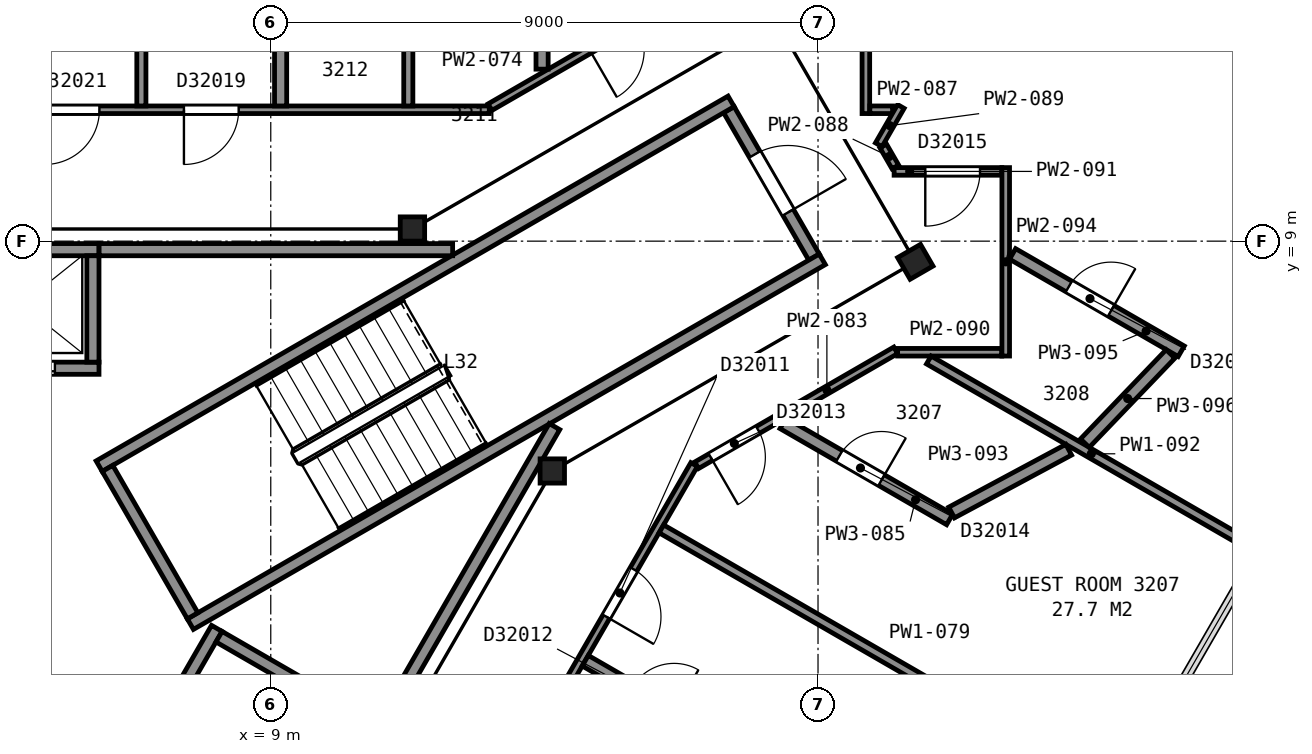
"""IFC4 building model, lengths in metres.
Left out: names, types, materials, properties, quantities, classifications, styles, units other than length and angle.
Written with IfcOpenShell. Run it as: python <this file> out.ifc"""

import sys

from ifc_helpers import new_model, si_unit, direction, frame, frame_2d, origin, origin_2d, place, context, subcontext, project, spatial, rectangle, i_section, extrude, element, fill, save


model = new_model("IFC4")
c1 = context("Model", 3, precision=1e-05, world=origin(), true_north=direction((0.0, 1.0)))
c2 = subcontext(c1, "Body", "Model", "MODEL_VIEW")
j1 = project(units=[si_unit("LENGTHUNIT", "METRE"), si_unit("PLANEANGLEUNIT", "RADIAN")], contexts=[c1])
p1 = place(None, origin())
s1 = spatial("IfcSite", under=j1, at=p1, CompositionType="ELEMENT")
p2 = place(p1, origin())
s2 = spatial("IfcBuilding", under=s1, at=p2, CompositionType="ELEMENT")
p3 = place(p2, frame((0.0, 0.0, 132.4)))
s3 = spatial("IfcBuildingStorey", under=s2, at=p3, CompositionType="ELEMENT", Elevation=132.4)
p4 = place(p3, frame((13.63, 5.22, 0.0), z_axis=(0.0, 0.0, 1.0), x_axis=(1.0, 0.0, 0.0)))
e1 = element("IfcColumn", 1, at=p4, inside=s3, PredefinedType="COLUMN", context=c2, shape_type="SweptSolid", body=[
    extrude(i_section(OverallWidth=0.401, OverallDepth=0.399, WebThickness=0.025, FlangeThickness=0.04, FilletRadius=0.015, at=origin_2d()), origin(), (0.0, 0.0, 1.0), 3.6),
])
p5 = place(p3, frame((19.6, 8.66, 0.0), z_axis=(0.0, 0.0, 1.0), x_axis=(0.5, -0.866025403784, 0.0)))
e2 = element("IfcColumn", 2, at=p5, inside=s3, PredefinedType="COLUMN", context=c2, shape_type="SweptSolid", body=[
    extrude(i_section(OverallWidth=0.411, OverallDepth=0.434, WebThickness=0.036, FlangeThickness=0.057, FilletRadius=0.015, at=origin_2d()), origin(), (0.0, 0.0, 1.0), 3.6),
])
p6 = place(p3, frame((11.33, 9.2, 0.0), z_axis=(0.0, 0.0, 1.0), x_axis=(1.0, 0.0, 0.0)))
e3 = element("IfcColumn", 3, at=p6, inside=s3, PredefinedType="COLUMN", context=c2, shape_type="SweptSolid", body=[
    extrude(i_section(OverallWidth=0.401, OverallDepth=0.399, WebThickness=0.025, FlangeThickness=0.04, FilletRadius=0.015, at=origin_2d()), origin(), (0.0, 0.0, 1.0), 3.6),
])
p7 = place(p3, frame((17.934, 8.738, 0.0), z_axis=(0.0, 0.0, 1.0), x_axis=(-0.49998411664, 0.866034573852, 0.0)))
e4 = element("IfcWall", 4, at=p7, inside=s3, PredefinedType="PARTITIONING", context=c2, shape_type="SweptSolid", body=[
    extrude(rectangle(XDim=2.8, YDim=0.2, at=frame_2d((1.4, 0.0))), origin(), (0.0, 0.0, 1.0), 3.35),
])
p8 = place(p7, frame((0.85, 0.0, 0.0)))
e5 = element("IfcOpeningElement", 5, at=p8, cuts=e4, PredefinedType="OPENING", context=c2, shape_type="SweptSolid", body=[
    extrude(rectangle(XDim=1.1, YDim=2.1, at=frame_2d((0.55, 1.05))), frame((0.0, 0.11, 0.0), z_axis=(0.0, -1.0, 0.0), x_axis=(1.0, 0.0, 0.0)), (0.0, 0.0, 1.0), 0.22),
])
for number, where, z_axis, x_axis in (
    (6, (6.178, 5.299, 0.0), (0.0, 0.0, 1.0), (0.866, 0.5, 0.0)),
    (7, (7.678, 2.701, 0.0), (0.0, 0.0, 1.0), (0.866, 0.5, 0.0)),
):
    element("IfcWall", number, at=place(p3, frame(where, z_axis=z_axis, x_axis=x_axis)), inside=s3, PredefinedType="PARTITIONING", context=c2, shape_type="SweptSolid", body=[
        extrude(rectangle(XDim=12.0, YDim=0.2, at=frame_2d((6.0, 0.0))), origin(), (0.0, 0.0, 1.0), 3.35),
    ])
p9 = place(p3, frame((7.715, 2.838, 0.0), z_axis=(0.0, 0.0, 1.0), x_axis=(-0.500049511043, 0.865996816683, 0.0)))
e8 = element("IfcWall", 8, at=p9, inside=s3, PredefinedType="PARTITIONING", context=c2, shape_type="SweptSolid", body=[
    extrude(rectangle(XDim=2.8, YDim=0.2, at=frame_2d((1.4, 0.0))), origin(), (0.0, 0.0, 1.0), 3.35),
])
p10 = place(p3, frame((3.625, 6.91, 0.0), z_axis=(0.0, 0.0, 1.0), x_axis=(1.0, 0.0, 0.0)))
e9 = element("IfcWall", 9, at=p10, inside=s3, PredefinedType="PARTITIONING", context=c2, shape_type="SweptSolid", body=[
    extrude(rectangle(XDim=2.55, YDim=0.2, at=frame_2d((1.275, 0.0))), origin(), (0.0, 0.0, 1.0), 3.6),
])
p11 = place(p10, frame((0.725, 0.0, 0.0)))
e10 = element("IfcOpeningElement", 10, at=p11, cuts=e9, PredefinedType="OPENING", context=c2, shape_type="SweptSolid", body=[
    extrude(rectangle(XDim=1.1, YDim=2.1, at=frame_2d((0.55, 1.05))), frame((0.0, 0.11, 0.0), z_axis=(0.0, -1.0, 0.0), x_axis=(1.0, 0.0, 0.0)), (0.0, 0.0, 1.0), 0.22),
])
p12 = place(p3, frame((3.625, 8.86, 0.0), z_axis=(0.0, 0.0, 1.0), x_axis=(1.0, 0.0, 0.0)))
e11 = element("IfcWall", 11, at=p12, inside=s3, PredefinedType="PARTITIONING", context=c2, shape_type="SweptSolid", body=[
    extrude(rectangle(XDim=2.55, YDim=0.2, at=frame_2d((1.275, 0.0))), origin(), (0.0, 0.0, 1.0), 3.6),
])
p13 = place(p3, frame((5.663, -1.612, 0.0), z_axis=(0.0, 0.0, 1.0), x_axis=(0.49998122708, 0.866036242063, 0.0)))
e12 = element("IfcWall", 12, at=p13, inside=s3, PredefinedType="PARTITIONING", context=c2, shape_type="SweptSolid", body=[
    extrude(rectangle(XDim=4.9, YDim=0.2, at=frame_2d((2.45, 0.0))), origin(), (0.0, 0.0, 1.0), 3.6),
])
p14 = place(p3, frame((6.075, 7.01, 0.0), z_axis=(0.0, 0.0, 1.0), x_axis=(0.0, 1.0, 0.0)))
e13 = element("IfcWall", 13, at=p14, inside=s3, PredefinedType="PARTITIONING", context=c2, shape_type="SweptSolid", body=[
    extrude(rectangle(XDim=1.75, YDim=0.2, at=frame_2d((0.875, 0.0))), origin(), (0.0, 0.0, 1.0), 3.6),
])
p15 = place(p3, frame((9.665, 1.62, 0.0), z_axis=(0.0, 0.0, 1.0), x_axis=(-0.866002029911, 0.500040482552, 0.0)))
e14 = element("IfcWall", 14, at=p15, inside=s3, PredefinedType="PARTITIONING", context=c2, shape_type="SweptSolid", body=[
    extrude(rectangle(XDim=1.75, YDim=0.2, at=frame_2d((0.875, 0.0))), origin(), (0.0, 0.0, 1.0), 3.6),
])
p16 = place(p3, frame((6.177, 8.86, 0.0), z_axis=(0.0, 0.0, 1.0), x_axis=(1.0, 0.0, 0.0)))
e15 = element("IfcWall", 15, at=p16, inside=s3, PredefinedType="PARTITIONING", context=c2, shape_type="SweptSolid", body=[
    extrude(rectangle(XDim=5.814, YDim=0.2, at=frame_2d((2.907, 0.0))), origin(), (0.0, 0.0, 1.0), 3.35),
])
p17 = place(p3, frame((8.492, -3.012, 0.0), z_axis=(0.0, 0.0, 1.0), x_axis=(0.499972957231, 0.866041016371, 0.0)))
e16 = element("IfcWall", 16, at=p17, inside=s3, PredefinedType="PARTITIONING", context=c2, shape_type="SweptSolid", body=[
    extrude(rectangle(XDim=10.349, YDim=0.2, at=frame_2d((5.174, 0.0))), origin(), (0.0, 0.0, 1.0), 3.35),
])
p18 = place(p3, frame((-12.594, 11.161, 0.0), z_axis=(0.0, 0.0, 1.0), x_axis=(1.0, 0.0, 0.0)))
e17 = element("IfcWall", 17, at=p18, inside=s3, PredefinedType="PARTITIONING", context=c2, shape_type="SweptSolid", body=[
    extrude(rectangle(XDim=25.187, YDim=0.125, at=frame_2d((12.594, 0.0))), origin(), (0.0, 0.0, 1.0), 2.613),
])
p19 = place(p18, frame((20.166, 0.0, 0.0)))
e18 = element("IfcOpeningElement", 18, at=p19, cuts=e17, PredefinedType="OPENING", context=c2, shape_type="SweptSolid", body=[
    extrude(rectangle(XDim=0.9, YDim=2.1, at=frame_2d((0.45, 1.05))), frame((0.0, 0.073, 0.0), z_axis=(0.0, -1.0, 0.0), x_axis=(1.0, 0.0, 0.0)), (0.0, 0.0, 1.0), 0.145),
])
p20 = place(p18, frame((17.875, 0.0, 0.0)))
e19 = element("IfcOpeningElement", 19, at=p20, cuts=e17, PredefinedType="OPENING", context=c2, shape_type="SweptSolid", body=[
    extrude(rectangle(XDim=0.9, YDim=2.1, at=frame_2d((0.45, 1.05))), frame((0.0, 0.073, 0.0), z_axis=(0.0, -1.0, 0.0), x_axis=(1.0, 0.0, 0.0)), (0.0, 0.0, 1.0), 0.145),
])
p21 = place(p18, frame((11.062, 0.0, 0.0)))
e20 = element("IfcOpeningElement", 20, at=p21, cuts=e17, PredefinedType="OPENING", context=c2, shape_type="SweptSolid", body=[
    extrude(rectangle(XDim=0.9, YDim=2.1, at=frame_2d((0.45, 1.05))), frame((0.0, 0.073, 0.0), z_axis=(0.0, -1.0, 0.0), x_axis=(1.0, 0.0, 0.0)), (0.0, 0.0, 1.0), 0.145),
])
p22 = place(p18, frame((8.521, 0.0, 0.0)))
e21 = element("IfcOpeningElement", 21, at=p22, cuts=e17, PredefinedType="OPENING", context=c2, shape_type="SweptSolid", body=[
    extrude(rectangle(XDim=0.9, YDim=2.1, at=frame_2d((0.45, 1.05))), frame((0.0, 0.073, 0.0), z_axis=(0.0, -1.0, 0.0), x_axis=(1.0, 0.0, 0.0)), (0.0, 0.0, 1.0), 0.145),
])
p23 = place(p18, frame((2.031, 0.0, 0.0)))
e22 = element("IfcOpeningElement", 22, at=p23, cuts=e17, PredefinedType="OPENING", context=c2, shape_type="SweptSolid", body=[
    extrude(rectangle(XDim=0.9, YDim=2.1, at=frame_2d((0.45, 1.05))), frame((0.0, 0.073, 0.0), z_axis=(0.0, -1.0, 0.0), x_axis=(1.0, 0.0, 0.0)), (0.0, 0.0, 1.0), 0.145),
])
p24 = place(p3, frame((15.962, 5.326, 0.0), z_axis=(0.0, 0.0, 1.0), x_axis=(-0.499992829944, -0.866029543379, 0.0)))
e23 = element("IfcWall", 23, at=p24, inside=s3, PredefinedType="PARTITIONING", context=c2, shape_type="SweptSolid", body=[
    extrude(rectangle(XDim=24.413, YDim=0.125, at=frame_2d((12.207, 0.0))), origin(), (0.0, 0.0, 1.0), 2.613),
])
p25 = place(p24, frame((21.258, 0.0, 0.0)))
e24 = element("IfcOpeningElement", 24, at=p25, cuts=e23, PredefinedType="OPENING", context=c2, shape_type="SweptSolid", body=[
    extrude(rectangle(XDim=0.9, YDim=2.1, at=frame_2d((0.45, 1.05))), frame((0.0, 0.073, 0.0), z_axis=(0.0, -1.0, 0.0), x_axis=(1.0, 0.0, 0.0)), (0.0, 0.0, 1.0), 0.145),
])
p26 = place(p24, frame((18.502, 0.0, 0.0)))
e25 = element("IfcOpeningElement", 25, at=p26, cuts=e23, PredefinedType="OPENING", context=c2, shape_type="SweptSolid", body=[
    extrude(rectangle(XDim=0.9, YDim=2.1, at=frame_2d((0.45, 1.05))), frame((0.0, 0.073, 0.0), z_axis=(0.0, -1.0, 0.0), x_axis=(1.0, 0.0, 0.0)), (0.0, 0.0, 1.0), 0.145),
])
p27 = place(p24, frame((11.799, 0.0, 0.0)))
e26 = element("IfcOpeningElement", 26, at=p27, cuts=e23, PredefinedType="OPENING", context=c2, shape_type="SweptSolid", body=[
    extrude(rectangle(XDim=0.9, YDim=2.1, at=frame_2d((0.45, 1.05))), frame((0.0, 0.073, 0.0), z_axis=(0.0, -1.0, 0.0), x_axis=(1.0, 0.0, 0.0)), (0.0, 0.0, 1.0), 0.145),
])
p28 = place(p24, frame((9.043, 0.0, 0.0)))
e27 = element("IfcOpeningElement", 27, at=p28, cuts=e23, PredefinedType="OPENING", context=c2, shape_type="SweptSolid", body=[
    extrude(rectangle(XDim=0.9, YDim=2.1, at=frame_2d((0.45, 1.05))), frame((0.0, 0.073, 0.0), z_axis=(0.0, -1.0, 0.0), x_axis=(1.0, 0.0, 0.0)), (0.0, 0.0, 1.0), 0.145),
])
p29 = place(p24, frame((1.99, 0.0, 0.0)))
e28 = element("IfcOpeningElement", 28, at=p29, cuts=e23, PredefinedType="OPENING", context=c2, shape_type="SweptSolid", body=[
    extrude(rectangle(XDim=0.9, YDim=2.1, at=frame_2d((0.45, 1.05))), frame((0.0, 0.073, 0.0), z_axis=(0.0, -1.0, 0.0), x_axis=(1.0, 0.0, 0.0)), (0.0, 0.0, 1.0), 0.145),
])
p30 = place(p3, frame((6.872, 11.223, 0.0), z_axis=(0.0, 0.0, 1.0), x_axis=(0.0, 1.0, 0.0)))
e29 = element("IfcWall", 29, at=p30, inside=s3, PredefinedType="PARTITIONING", context=c2, shape_type="SweptSolid", body=[
    extrude(rectangle(XDim=8.592, YDim=0.15, at=frame_2d((4.296, 0.0))), origin(), (0.0, 0.0, 1.0), 2.613),
])
p31 = place(p3, frame((9.162, 11.223, 0.0), z_axis=(0.0, 0.0, 1.0), x_axis=(0.0, 1.0, 0.0)))
e30 = element("IfcWall", 30, at=p31, inside=s3, PredefinedType="PARTITIONING", context=c2, shape_type="SweptSolid", body=[
    extrude(rectangle(XDim=2.738, YDim=0.2, at=frame_2d((1.369, 0.0))), origin(), (0.0, 0.0, 1.0), 2.613),
])
p32 = place(p3, frame((11.262, 11.223, 0.0), z_axis=(0.0, 0.0, 1.0), x_axis=(0.0, 1.0, 0.0)))
e31 = element("IfcWall", 31, at=p32, inside=s3, PredefinedType="PARTITIONING", context=c2, shape_type="SweptSolid", body=[
    extrude(rectangle(XDim=8.592, YDim=0.15, at=frame_2d((4.296, 0.0))), origin(), (0.0, 0.0, 1.0), 2.613),
])
p33 = place(p3, frame((12.605, 11.203, 0.0), z_axis=(0.0, 0.0, 1.0), x_axis=(0.866113281362, 0.499847760672, 0.0)))
e32 = element("IfcWall", 32, at=p33, inside=s3, PredefinedType="PARTITIONING", context=c2, shape_type="SweptSolid", body=[
    extrude(rectangle(XDim=3.767, YDim=0.125, at=frame_2d((1.883, 0.0))), origin(), (0.0, 0.0, 1.0), 2.613),
])
p34 = place(p33, frame((1.89, 0.0, 0.0)))
e33 = element("IfcOpeningElement", 33, at=p34, cuts=e32, PredefinedType="OPENING", context=c2, shape_type="SweptSolid", body=[
    extrude(rectangle(XDim=0.9, YDim=2.1, at=frame_2d((0.45, 1.05))), frame((0.0, 0.073, 0.0), z_axis=(0.0, -1.0, 0.0), x_axis=(1.0, 0.0, 0.0)), (0.0, 0.0, 1.0), 0.145),
])
p35 = place(p3, frame((13.462, 11.829, 0.0), z_axis=(0.0, 0.0, 1.0), x_axis=(0.0, 1.0, 0.0)))
e34 = element("IfcWall", 34, at=p35, inside=s3, PredefinedType="PARTITIONING", context=c2, shape_type="SweptSolid", body=[
    extrude(rectangle(XDim=3.203, YDim=0.2, at=frame_2d((1.602, 0.0))), origin(), (0.0, 0.0, 1.0), 2.613),
])
p36 = place(p3, frame((16.542, 0.731, 0.0), z_axis=(0.0, 0.0, 1.0), x_axis=(-0.86596722502, 0.50010075504, 0.0)))
e35 = element("IfcWall", 35, at=p36, inside=s3, PredefinedType="PARTITIONING", context=c2, shape_type="SweptSolid", body=[
    extrude(rectangle(XDim=2.737, YDim=0.2, at=frame_2d((1.369, 0.0))), origin(), (0.0, 0.0, 1.0), 2.613),
])
p37 = place(p36, frame((1.05, 0.0, 0.0)))
e36 = element("IfcOpeningElement", 36, at=p37, cuts=e35, PredefinedType="OPENING", context=c2, shape_type="SweptSolid", body=[
    extrude(rectangle(XDim=0.8, YDim=2.1, at=frame_2d((0.4, 1.05))), frame((0.0, 0.11, 0.0), z_axis=(0.0, -1.0, 0.0), x_axis=(1.0, 0.0, 0.0)), (0.0, 0.0, 1.0), 0.22),
])
p38 = place(p3, frame((15.424, 4.268, 0.0), z_axis=(0.0, 0.0, 1.0), x_axis=(0.866022320763, -0.500005339912, 0.0)))
e37 = element("IfcWall", 37, at=p38, inside=s3, PredefinedType="PARTITIONING", context=c2, shape_type="SweptSolid", body=[
    extrude(rectangle(XDim=8.591, YDim=0.15, at=frame_2d((4.296, 0.0))), origin(), (0.0, 0.0, 1.0), 2.613),
])
p39 = place(p3, frame((19.278, 7.204, 0.0), z_axis=(0.0, 0.0, 1.0), x_axis=(-0.866028547684, -0.499994554566, 0.0)))
e38 = element("IfcWall", 38, at=p39, inside=s3, PredefinedType="PARTITIONING", context=c2, shape_type="SweptSolid", body=[
    extrude(rectangle(XDim=3.78, YDim=0.125, at=frame_2d((1.89, 0.0))), origin(), (0.0, 0.0, 1.0), 2.613),
])
p40 = place(p39, frame((2.615, 0.0, 0.0)))
e39 = element("IfcOpeningElement", 39, at=p40, cuts=e38, PredefinedType="OPENING", context=c2, shape_type="SweptSolid", body=[
    extrude(rectangle(XDim=0.9, YDim=2.1, at=frame_2d((0.45, 1.05))), frame((0.0, 0.073, 0.0), z_axis=(0.0, -1.0, 0.0), x_axis=(1.0, 0.0, 0.0)), (0.0, 0.0, 1.0), 0.145),
])
p41 = place(p3, frame((17.425, 6.004, 0.0), z_axis=(0.0, 0.0, 1.0), x_axis=(0.866145753309, -0.499791490549, 0.0)))
e40 = element("IfcWall", 40, at=p41, inside=s3, PredefinedType="PARTITIONING", context=c2, shape_type="SweptSolid", body=[
    extrude(rectangle(XDim=3.163, YDim=0.2, at=frame_2d((1.582, 0.0))), origin(), (0.0, 0.0, 1.0), 2.613),
])
p42 = place(p41, frame((1.07, 0.0, 0.0)))
e41 = element("IfcOpeningElement", 41, at=p42, cuts=e40, PredefinedType="OPENING", context=c2, shape_type="SweptSolid", body=[
    extrude(rectangle(XDim=0.8, YDim=2.1, at=frame_2d((0.4, 1.05))), frame((0.0, 0.11, 0.0), z_axis=(0.0, -1.0, 0.0), x_axis=(1.0, 0.0, 0.0)), (0.0, 0.0, 1.0), 0.22),
])
p43 = place(p3, frame((18.787, 11.098, 0.0), z_axis=(0.0, 0.0, 1.0), x_axis=(0.0, 1.0, 0.0)))
e42 = element("IfcWall", 42, at=p43, inside=s3, PredefinedType="PARTITIONING", context=c2, shape_type="SweptSolid", body=[
    extrude(rectangle(XDim=2.964, YDim=0.125, at=frame_2d((1.482, 0.0))), origin(), (0.0, 0.0, 1.0), 2.613),
])
p44 = place(p3, frame((18.852, 11.161, 0.0), z_axis=(0.0, 0.0, 1.0), x_axis=(1.0, 0.0, 0.0)))
e43 = element("IfcWall", 43, at=p44, inside=s3, PredefinedType="PARTITIONING", context=c2, shape_type="SweptSolid", body=[
    extrude(rectangle(XDim=0.374, YDim=0.125, at=frame_2d((0.187, 0.0))), origin(), (0.0, 0.0, 1.0), 2.613),
])
p45 = place(p3, frame((19.073, 10.565, 0.0), z_axis=(0.0, 0.0, 1.0), x_axis=(0.499899443193, -0.866083452501, 0.0)))
e44 = element("IfcWall", 44, at=p45, inside=s3, PredefinedType="PARTITIONING", context=c2, shape_type="SweptSolid", body=[
    extrude(rectangle(XDim=0.398, YDim=0.125, at=frame_2d((0.199, 0.0))), origin(), (0.0, 0.0, 1.0), 2.613),
])
p46 = place(p3, frame((18.999, 10.585, 0.0), z_axis=(0.0, 0.0, 1.0), x_axis=(0.499712769023, 0.866191173169, 0.0)))
e45 = element("IfcWall", 45, at=p46, inside=s3, PredefinedType="PARTITIONING", context=c2, shape_type="SweptSolid", body=[
    extrude(rectangle(XDim=0.728, YDim=0.125, at=frame_2d((0.364, 0.0))), origin(), (0.0, 0.0, 1.0), 2.613),
])
p47 = place(p3, frame((19.309, 7.173, 0.0), z_axis=(0.0, 0.0, 1.0), x_axis=(1.0, 0.0, 0.0)))
e46 = element("IfcWall", 46, at=p47, inside=s3, PredefinedType="PARTITIONING", context=c2, shape_type="SweptSolid", body=[
    extrude(rectangle(XDim=1.713, YDim=0.125, at=frame_2d((0.856, 0.0))), origin(), (0.0, 0.0, 1.0), 2.613),
])
p48 = place(p3, frame((19.251, 10.147, 0.0), z_axis=(0.0, 0.0, 1.0), x_axis=(1.0, 0.0, 0.0)))
e47 = element("IfcWall", 47, at=p48, inside=s3, PredefinedType="PARTITIONING", context=c2, shape_type="SweptSolid", body=[
    extrude(rectangle(XDim=1.771, YDim=0.125, at=frame_2d((0.885, 0.0))), origin(), (0.0, 0.0, 1.0), 2.613),
])
p49 = place(p48, frame((0.512, 0.0, 0.0)))
e48 = element("IfcOpeningElement", 48, at=p49, cuts=e47, PredefinedType="OPENING", context=c2, shape_type="SweptSolid", body=[
    extrude(rectangle(XDim=0.9, YDim=2.1, at=frame_2d((0.45, 1.05))), frame((0.0, 0.073, 0.0), z_axis=(0.0, -1.0, 0.0), x_axis=(1.0, 0.0, 0.0)), (0.0, 0.0, 1.0), 0.145),
])
p50 = place(p3, frame((19.822, 7.046, 0.0), z_axis=(0.0, 0.0, 1.0), x_axis=(0.866041323853, -0.499972424619, 0.0)))
e49 = element("IfcWall", 49, at=p50, inside=s3, PredefinedType="PARTITIONING", context=c2, shape_type="SweptSolid", body=[
    extrude(rectangle(XDim=6.172, YDim=0.15, at=frame_2d((3.086, 0.0))), origin(), (0.0, 0.0, 1.0), 2.613),
])
p51 = place(p3, frame((20.197, 4.537, 0.0), z_axis=(0.0, 0.0, 1.0), x_axis=(0.881162538645, 0.472813473253, 0.0)))
e50 = element("IfcWall", 50, at=p51, inside=s3, PredefinedType="PARTITIONING", context=c2, shape_type="SweptSolid", body=[
    extrude(rectangle(XDim=2.185, YDim=0.2, at=frame_2d((1.093, 0.0))), origin(), (0.0, 0.0, 1.0), 2.613),
])
p52 = place(p3, frame((21.087, 7.111, 0.0), z_axis=(0.0, 0.0, 1.0), x_axis=(0.0, 1.0, 0.0)))
e51 = element("IfcWall", 51, at=p52, inside=s3, PredefinedType="PARTITIONING", context=c2, shape_type="SweptSolid", body=[
    extrude(rectangle(XDim=3.099, YDim=0.125, at=frame_2d((1.549, 0.0))), origin(), (0.0, 0.0, 1.0), 2.613),
])
p53 = place(p3, frame((23.974, 7.189, 0.0), z_axis=(0.0, 0.0, 1.0), x_axis=(-0.866105631149, 0.499861016376, 0.0)))
e52 = element("IfcWall", 52, at=p53, inside=s3, PredefinedType="PARTITIONING", context=c2, shape_type="SweptSolid", body=[
    extrude(rectangle(XDim=3.203, YDim=0.2, at=frame_2d((1.602, 0.0))), origin(), (0.0, 0.0, 1.0), 2.613),
])
p54 = place(p53, frame((1.333, 0.0, 0.0)))
e53 = element("IfcOpeningElement", 53, at=p54, cuts=e52, PredefinedType="OPENING", context=c2, shape_type="SweptSolid", body=[
    extrude(rectangle(XDim=0.8, YDim=2.1, at=frame_2d((0.4, 1.05))), frame((0.0, 0.11, 0.0), z_axis=(0.0, -1.0, 0.0), x_axis=(1.0, 0.0, 0.0)), (0.0, 0.0, 1.0), 0.22),
])
p55 = place(p3, frame((22.388, 5.677, 0.0), z_axis=(0.0, 0.0, 1.0), x_axis=(0.692374421384, 0.721538398572, 0.0)))
e54 = element("IfcWall", 54, at=p55, inside=s3, PredefinedType="PARTITIONING", context=c2, shape_type="SweptSolid", body=[
    extrude(rectangle(XDim=2.034, YDim=0.2, at=frame_2d((1.017, 0.0))), origin(), (0.0, 0.0, 1.0), 2.613),
])
p56 = place(p8, origin())
e55 = element("IfcDoor", 55, at=p56, inside=s3, OperationType="SINGLE_SWING_LEFT", PredefinedType="DOOR", context=c2, shape_type="SweptSolid", body=[
    extrude(rectangle(XDim=1.1, YDim=2.1, at=frame_2d((0.55, 1.05))), frame((0.0, 0.025, 0.0), z_axis=(0.0, -1.0, 0.0), x_axis=(1.0, 0.0, 0.0)), (0.0, 0.0, 1.0), 0.05),
])
fill(e5, e55)
p57 = place(p11, origin())
e56 = element("IfcDoor", 56, at=p57, inside=s3, OperationType="SLIDING_TO_LEFT", PredefinedType="DOOR", context=c2, shape_type="SweptSolid", body=[
    extrude(rectangle(XDim=1.1, YDim=2.1, at=frame_2d((0.55, 1.05))), frame((0.0, 0.025, 0.0), z_axis=(0.0, -1.0, 0.0), x_axis=(1.0, 0.0, 0.0)), (0.0, 0.0, 1.0), 0.05),
])
fill(e10, e56)
p58 = place(p19, origin())
e57 = element("IfcDoor", 57, at=p58, inside=s3, OperationType="SINGLE_SWING_LEFT", PredefinedType="DOOR", context=c2, shape_type="SweptSolid", body=[
    extrude(rectangle(XDim=0.9, YDim=2.1, at=frame_2d((0.45, 1.05))), frame((0.0, 0.025, 0.0), z_axis=(0.0, -1.0, 0.0), x_axis=(1.0, 0.0, 0.0)), (0.0, 0.0, 1.0), 0.05),
])
fill(e18, e57)
p59 = place(p20, origin())
e58 = element("IfcDoor", 58, at=p59, inside=s3, OperationType="SINGLE_SWING_LEFT", PredefinedType="DOOR", context=c2, shape_type="SweptSolid", body=[
    extrude(rectangle(XDim=0.9, YDim=2.1, at=frame_2d((0.45, 1.05))), frame((0.0, 0.025, 0.0), z_axis=(0.0, -1.0, 0.0), x_axis=(1.0, 0.0, 0.0)), (0.0, 0.0, 1.0), 0.05),
])
fill(e19, e58)
p60 = place(p29, origin())
e59 = element("IfcDoor", 59, at=p60, inside=s3, OperationType="SINGLE_SWING_RIGHT", PredefinedType="DOOR", context=c2, shape_type="SweptSolid", body=[
    extrude(rectangle(XDim=0.9, YDim=2.1, at=frame_2d((0.45, 1.05))), frame((0.0, 0.025, 0.0), z_axis=(0.0, -1.0, 0.0), x_axis=(1.0, 0.0, 0.0)), (0.0, 0.0, 1.0), 0.05),
])
fill(e28, e59)
p61 = place(p40, origin())
e60 = element("IfcDoor", 60, at=p61, inside=s3, OperationType="SINGLE_SWING_RIGHT", PredefinedType="DOOR", context=c2, shape_type="SweptSolid", body=[
    extrude(rectangle(XDim=0.9, YDim=2.1, at=frame_2d((0.45, 1.05))), frame((0.0, 0.025, 0.0), z_axis=(0.0, -1.0, 0.0), x_axis=(1.0, 0.0, 0.0)), (0.0, 0.0, 1.0), 0.05),
])
fill(e39, e60)
p62 = place(p42, origin())
e61 = element("IfcDoor", 61, at=p62, inside=s3, OperationType="SINGLE_SWING_RIGHT", PredefinedType="DOOR", context=c2, shape_type="SweptSolid", body=[
    extrude(rectangle(XDim=0.8, YDim=2.1, at=frame_2d((0.4, 1.05))), frame((0.0, 0.025, 0.0), z_axis=(0.0, -1.0, 0.0), x_axis=(1.0, 0.0, 0.0)), (0.0, 0.0, 1.0), 0.05),
])
fill(e41, e61)
p63 = place(p49, origin())
e62 = element("IfcDoor", 62, at=p63, inside=s3, OperationType="SINGLE_SWING_LEFT", PredefinedType="DOOR", context=c2, shape_type="SweptSolid", body=[
    extrude(rectangle(XDim=0.9, YDim=2.1, at=frame_2d((0.45, 1.05))), frame((0.0, 0.025, 0.0), z_axis=(0.0, -1.0, 0.0), x_axis=(1.0, 0.0, 0.0)), (0.0, 0.0, 1.0), 0.05),
])
fill(e48, e62)
p64 = place(p54, origin())
e63 = element("IfcDoor", 63, at=p64, inside=s3, OperationType="SINGLE_SWING_LEFT", PredefinedType="DOOR", context=c2, shape_type="SweptSolid", body=[
    extrude(rectangle(XDim=0.8, YDim=2.1, at=frame_2d((0.4, 1.05))), frame((0.0, 0.025, 0.0), z_axis=(0.0, -1.0, 0.0), x_axis=(1.0, 0.0, 0.0)), (0.0, 0.0, 1.0), 0.05),
])
fill(e53, e63)
save(model, sys.argv[1])
